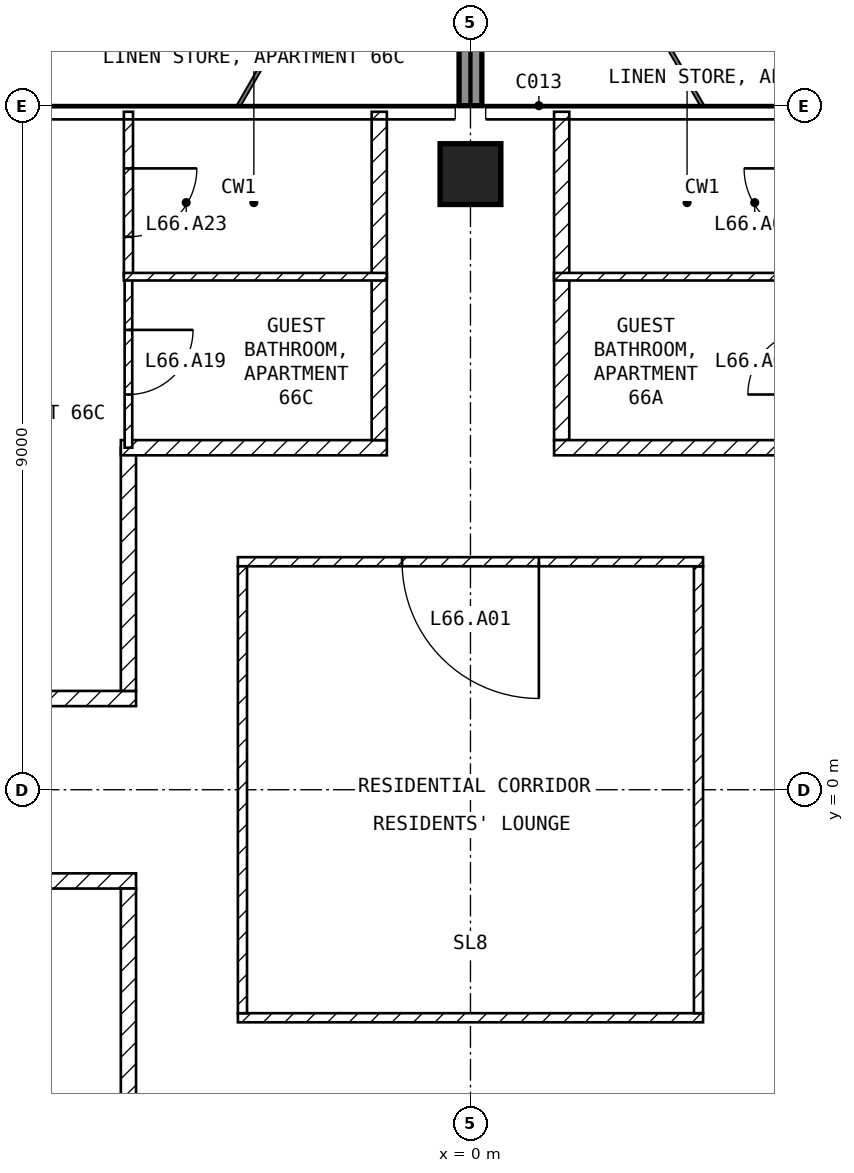
"""IFC4 building model, lengths in metres.
Left out: names, types, materials, properties, quantities, classifications, styles, units other than length and angle.
Written with IfcOpenShell. Run it as: python <this file> out.ifc"""

import sys

from ifc_helpers import new_model, si_unit, direction, frame, frame_2d, origin, origin_2d, place, context, subcontext, project, spatial, rectangle, extrude, element, fill, save


model = new_model("IFC4")
c1 = context("Model", 3, precision=1e-05, world=origin(), true_north=direction((0.0, 1.0)))
c2 = subcontext(c1, "Body", "Model", "MODEL_VIEW")
j1 = project(units=[si_unit("LENGTHUNIT", "METRE"), si_unit("PLANEANGLEUNIT", "RADIAN")], contexts=[c1])
p1 = place(None, origin())
s1 = spatial("IfcSite", under=j1, at=p1, CompositionType="ELEMENT")
p2 = place(p1, origin())
s2 = spatial("IfcBuilding", under=s1, at=p2, CompositionType="ELEMENT")
p3 = place(p2, frame((0.0, 0.0, 260.5)))
s3 = spatial("IfcBuildingStorey", under=s2, at=p3, CompositionType="ELEMENT", Elevation=260.5)
p4 = place(p3, frame((0.0, 8.1, -0.25), z_axis=(0.0, 0.0, 1.0), x_axis=(1.0, 0.0, 0.0)))
e1 = element("IfcColumn", 1, at=p4, inside=s3, PredefinedType="COLUMN", context=c2, shape_type="SweptSolid", body=[
    extrude(rectangle(XDim=0.8, YDim=0.8, at=origin_2d()), origin(), (0.0, 0.0, 1.0), 3.5),
])
p5 = place(p3, frame((0.0, 9.0, 0.0), z_axis=(0.0, 0.0, 1.0), x_axis=(0.0, 1.0, 0.0)))
e2 = element("IfcWall", 2, at=p5, inside=s3, PredefinedType="SOLIDWALL", context=c2, shape_type="SweptSolid", body=[
    extrude(rectangle(XDim=2.7, YDim=0.3, at=frame_2d((1.35, 0.0))), origin(), (0.0, 0.0, 1.0), 3.25),
])
p6 = place(p3, frame((-3.06, -3.0, 0.0), z_axis=(0.0, 0.0, 1.0), x_axis=(1.0, 0.0, 0.0)))
e3 = element("IfcWall", 3, at=p6, inside=s3, PredefinedType="PARTITIONING", context=c2, shape_type="SweptSolid", body=[
    extrude(rectangle(XDim=6.12, YDim=0.12, at=frame_2d((3.06, 0.0))), origin(), (0.0, 0.0, 1.0), 3.25),
])
p7 = place(p3, frame((3.0, -2.94, 0.0), z_axis=(0.0, 0.0, 1.0), x_axis=(0.0, 1.0, 0.0)))
e4 = element("IfcWall", 4, at=p7, inside=s3, PredefinedType="PARTITIONING", context=c2, shape_type="SweptSolid", body=[
    extrude(rectangle(XDim=5.88, YDim=0.12, at=frame_2d((2.94, 0.0))), origin(), (0.0, 0.0, 1.0), 3.25),
])
p8 = place(p3, frame((3.06, 3.0, 0.0), z_axis=(0.0, 0.0, 1.0), x_axis=(-1.0, 0.0, 0.0)))
e5 = element("IfcWall", 5, at=p8, inside=s3, PredefinedType="PARTITIONING", context=c2, shape_type="SweptSolid", body=[
    extrude(rectangle(XDim=6.12, YDim=0.12, at=frame_2d((3.06, 0.0))), origin(), (0.0, 0.0, 1.0), 3.25),
])
p9 = place(p8, frame((2.16, 0.0, 0.0)))
e6 = element("IfcOpeningElement", 6, at=p9, cuts=e5, PredefinedType="OPENING", context=c2, shape_type="SweptSolid", body=[
    extrude(rectangle(XDim=1.8, YDim=2.1, at=frame_2d((0.9, 1.05))), frame((0.0, 0.07, 0.0), z_axis=(0.0, -1.0, 0.0), x_axis=(1.0, 0.0, 0.0)), (0.0, 0.0, 1.0), 0.14),
])
p10 = place(p3, frame((-3.0, 2.94, 0.0), z_axis=(0.0, 0.0, 1.0), x_axis=(0.0, -1.0, 0.0)))
e7 = element("IfcWall", 7, at=p10, inside=s3, PredefinedType="PARTITIONING", context=c2, shape_type="SweptSolid", body=[
    extrude(rectangle(XDim=5.88, YDim=0.12, at=frame_2d((2.94, 0.0))), origin(), (0.0, 0.0, 1.0), 3.25),
])
p11 = place(p3, frame((1.2, 8.92, 0.0), z_axis=(0.0, 0.0, 1.0), x_axis=(0.0, -1.0, 0.0)))
e8 = element("IfcWall", 8, at=p11, inside=s3, PredefinedType="PARTITIONING", context=c2, shape_type="SweptSolid", body=[
    extrude(rectangle(XDim=4.32, YDim=0.2, at=frame_2d((2.16, 0.0))), origin(), (0.0, 0.0, 1.0), 3.25),
])
p12 = place(p3, frame((1.1, 4.5, 0.0), z_axis=(0.0, 0.0, 1.0), x_axis=(1.0, 0.0, 0.0)))
e9 = element("IfcWall", 9, at=p12, inside=s3, PredefinedType="PARTITIONING", context=c2, shape_type="SweptSolid", body=[
    extrude(rectangle(XDim=3.5, YDim=0.2, at=frame_2d((1.75, 0.0))), origin(), (0.0, 0.0, 1.0), 3.25),
])
p13 = place(p3, frame((-21.6, 1.2, 0.0), z_axis=(0.0, 0.0, 1.0), x_axis=(1.0, 0.0, 0.0)))
e10 = element("IfcWall", 10, at=p13, inside=s3, PredefinedType="PARTITIONING", context=c2, shape_type="SweptSolid", body=[
    extrude(rectangle(XDim=17.2, YDim=0.2, at=frame_2d((8.6, 0.0))), origin(), (0.0, 0.0, 1.0), 3.25),
])
p14 = place(p13, frame((6.1, 0.0, 0.0)))
e11 = element("IfcOpeningElement", 11, at=p14, cuts=e10, PredefinedType="OPENING", context=c2, shape_type="SweptSolid", body=[
    extrude(rectangle(XDim=1.0, YDim=2.1, at=frame_2d((0.5, 1.05))), frame((0.0, 0.11, 0.0), z_axis=(0.0, -1.0, 0.0), x_axis=(1.0, 0.0, 0.0)), (0.0, 0.0, 1.0), 0.22),
])
p15 = place(p3, frame((-4.5, 1.3, 0.0), z_axis=(0.0, 0.0, 1.0), x_axis=(0.0, 1.0, 0.0)))
e12 = element("IfcWall", 12, at=p15, inside=s3, PredefinedType="PARTITIONING", context=c2, shape_type="SweptSolid", body=[
    extrude(rectangle(XDim=3.2, YDim=0.2, at=frame_2d((1.6, 0.0))), origin(), (0.0, 0.0, 1.0), 3.25),
])
p16 = place(p3, frame((-4.6, 4.5, 0.0), z_axis=(0.0, 0.0, 1.0), x_axis=(1.0, 0.0, 0.0)))
e13 = element("IfcWall", 13, at=p16, inside=s3, PredefinedType="PARTITIONING", context=c2, shape_type="SweptSolid", body=[
    extrude(rectangle(XDim=3.5, YDim=0.2, at=frame_2d((1.75, 0.0))), origin(), (0.0, 0.0, 1.0), 3.25),
])
p17 = place(p3, frame((-1.2, 4.6, 0.0), z_axis=(0.0, 0.0, 1.0), x_axis=(0.0, 1.0, 0.0)))
e14 = element("IfcWall", 14, at=p17, inside=s3, PredefinedType="PARTITIONING", context=c2, shape_type="SweptSolid", body=[
    extrude(rectangle(XDim=4.32, YDim=0.2, at=frame_2d((2.16, 0.0))), origin(), (0.0, 0.0, 1.0), 3.25),
])
p18 = place(p3, frame((-4.4, -1.2, 0.0), z_axis=(0.0, 0.0, 1.0), x_axis=(-1.0, 0.0, 0.0)))
e15 = element("IfcWall", 15, at=p18, inside=s3, PredefinedType="PARTITIONING", context=c2, shape_type="SweptSolid", body=[
    extrude(rectangle(XDim=17.2, YDim=0.2, at=frame_2d((8.6, 0.0))), origin(), (0.0, 0.0, 1.0), 3.25),
])
p19 = place(p18, frame((12.05, 0.0, 0.0)))
e16 = element("IfcOpeningElement", 16, at=p19, cuts=e15, PredefinedType="OPENING", context=c2, shape_type="SweptSolid", body=[
    extrude(rectangle(XDim=1.0, YDim=2.1, at=frame_2d((0.5, 1.05))), frame((0.0, 0.11, 0.0), z_axis=(0.0, -1.0, 0.0), x_axis=(1.0, 0.0, 0.0)), (0.0, 0.0, 1.0), 0.22),
])
p20 = place(p3, frame((-4.5, -4.5, 0.0), z_axis=(0.0, 0.0, 1.0), x_axis=(0.0, 1.0, 0.0)))
e17 = element("IfcWall", 17, at=p20, inside=s3, PredefinedType="PARTITIONING", context=c2, shape_type="SweptSolid", body=[
    extrude(rectangle(XDim=3.2, YDim=0.2, at=frame_2d((1.6, 0.0))), origin(), (0.0, 0.0, 1.0), 3.25),
])
p21 = place(p3, frame((1.1, 6.75, 0.0), z_axis=(0.0, 0.0, 1.0), x_axis=(1.0, 0.0, 0.0)))
e18 = element("IfcWall", 18, at=p21, inside=s3, PredefinedType="PARTITIONING", context=c2, shape_type="SweptSolid", body=[
    extrude(rectangle(XDim=3.46, YDim=0.1, at=frame_2d((1.73, 0.0))), origin(), (0.0, 0.0, 1.0), 3.25),
])
p22 = place(p3, frame((-4.5, 6.75, 0.0), z_axis=(0.0, 0.0, 1.0), x_axis=(0.0, -1.0, 0.0)))
e19 = element("IfcWall", 19, at=p22, inside=s3, PredefinedType="PARTITIONING", context=c2, shape_type="SweptSolid", body=[
    extrude(rectangle(XDim=2.25, YDim=0.1, at=frame_2d((1.125, 0.0))), origin(), (0.0, 0.0, 1.0), 3.25),
])
p23 = place(p22, frame((0.7, 0.0, 0.0)))
e20 = element("IfcOpeningElement", 20, at=p23, cuts=e19, PredefinedType="OPENING", context=c2, shape_type="SweptSolid", body=[
    extrude(rectangle(XDim=0.85, YDim=2.1, at=frame_2d((0.425, 1.05))), frame((0.0, 0.06, 0.0), z_axis=(0.0, -1.0, 0.0), x_axis=(1.0, 0.0, 0.0)), (0.0, 0.0, 1.0), 0.12),
])
p24 = place(p3, frame((-4.5, 8.92, 0.0), z_axis=(0.0, 0.0, 1.0), x_axis=(0.0, -1.0, 0.0)))
e21 = element("IfcWall", 21, at=p24, inside=s3, PredefinedType="PARTITIONING", context=c2, shape_type="SweptSolid", body=[
    extrude(rectangle(XDim=2.17, YDim=0.12, at=frame_2d((1.085, 0.0))), origin(), (0.0, 0.0, 1.0), 3.25),
])
p25 = place(p24, frame((0.745, 0.0, 0.0)))
e22 = element("IfcOpeningElement", 22, at=p25, cuts=e21, PredefinedType="OPENING", context=c2, shape_type="SweptSolid", body=[
    extrude(rectangle(XDim=0.9, YDim=2.1, at=frame_2d((0.45, 1.05))), frame((0.0, 0.07, 0.0), z_axis=(0.0, -1.0, 0.0), x_axis=(1.0, 0.0, 0.0)), (0.0, 0.0, 1.0), 0.14),
])
p26 = place(p3, frame((-4.56, 6.75, 0.0), z_axis=(0.0, 0.0, 1.0), x_axis=(1.0, 0.0, 0.0)))
e23 = element("IfcWall", 23, at=p26, inside=s3, PredefinedType="PARTITIONING", context=c2, shape_type="SweptSolid", body=[
    extrude(rectangle(XDim=3.46, YDim=0.1, at=frame_2d((1.73, 0.0))), origin(), (0.0, 0.0, 1.0), 3.25),
])
p27 = place(p9, origin())
e24 = element("IfcDoor", 24, at=p27, inside=s3, OperationType="SINGLE_SWING_LEFT", PredefinedType="DOOR", context=c2, shape_type="SweptSolid", body=[
    extrude(rectangle(XDim=1.8, YDim=2.1, at=frame_2d((0.9, 1.05))), frame((0.0, 0.025, 0.0), z_axis=(0.0, -1.0, 0.0), x_axis=(1.0, 0.0, 0.0)), (0.0, 0.0, 1.0), 0.05),
])
fill(e6, e24)
p28 = place(p23, origin())
e25 = element("IfcDoor", 25, at=p28, inside=s3, OperationType="SINGLE_SWING_LEFT", PredefinedType="DOOR", context=c2, shape_type="SweptSolid", body=[
    extrude(rectangle(XDim=0.85, YDim=2.1, at=frame_2d((0.425, 1.05))), frame((0.0, 0.025, 0.0), z_axis=(0.0, -1.0, 0.0), x_axis=(1.0, 0.0, 0.0)), (0.0, 0.0, 1.0), 0.05),
])
fill(e20, e25)
p29 = place(p25, origin())
e26 = element("IfcDoor", 26, at=p29, inside=s3, OperationType="SINGLE_SWING_LEFT", PredefinedType="DOOR", context=c2, shape_type="SweptSolid", body=[
    extrude(rectangle(XDim=0.9, YDim=2.1, at=frame_2d((0.45, 1.05))), frame((0.0, 0.025, 0.0), z_axis=(0.0, -1.0, 0.0), x_axis=(1.0, 0.0, 0.0)), (0.0, 0.0, 1.0), 0.05),
])
fill(e22, e26)
save(model, sys.argv[1])
